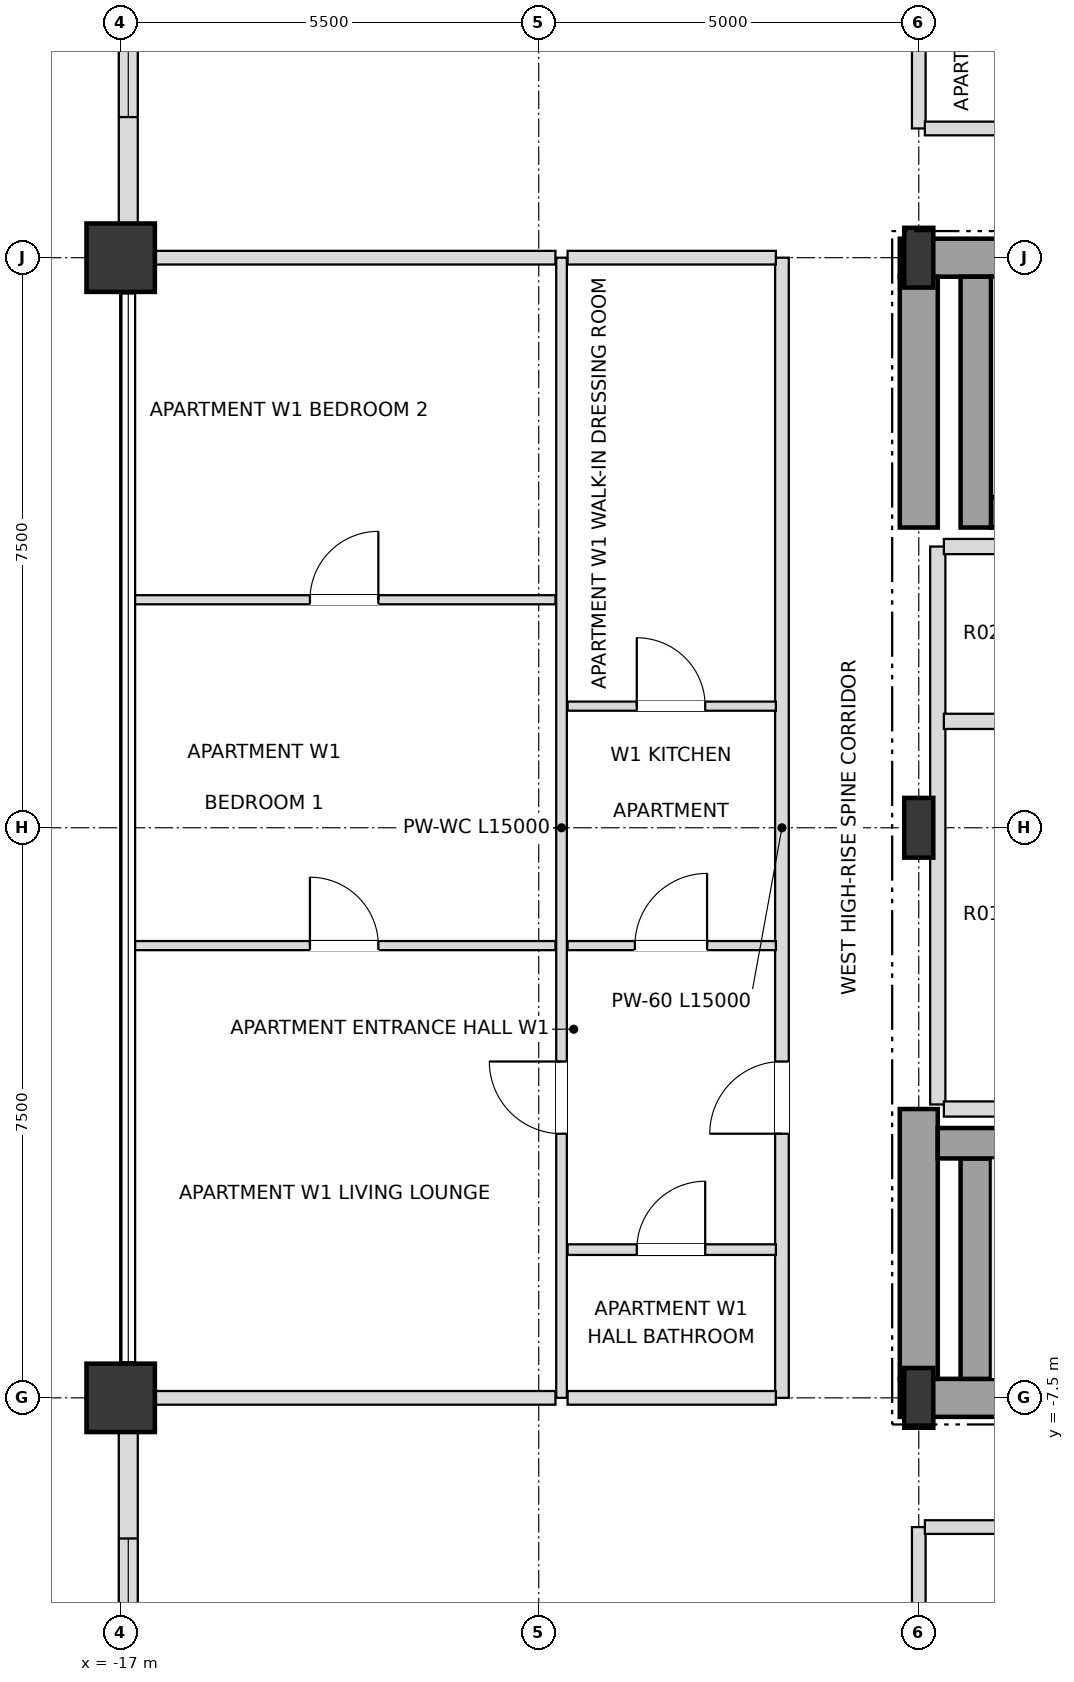
"""IFC4 building model, lengths in metres.
Left out: names, types, materials, properties, quantities, classifications, styles, units other than length and angle.
Written with IfcOpenShell. Run it as: python <this file> out.ifc"""

import sys

from ifc_helpers import new_model, si_unit, direction, frame, frame_2d, origin, origin_2d, place, context, subcontext, project, spatial, rectangle, i_section, extrude, element, fill, save


model = new_model("IFC4")
c1 = context("Model", 3, precision=1e-05, world=origin(), true_north=direction((0.0, 1.0)))
c2 = subcontext(c1, "Body", "Model", "MODEL_VIEW")
j1 = project(units=[si_unit("LENGTHUNIT", "METRE"), si_unit("PLANEANGLEUNIT", "RADIAN")], contexts=[c1])
p1 = place(None, origin())
s1 = spatial("IfcSite", under=j1, at=p1, CompositionType="ELEMENT")
p2 = place(p1, origin())
s2 = spatial("IfcBuilding", under=s1, at=p2, CompositionType="ELEMENT")
p3 = place(p2, frame((0.0, 0.0, 247.5)))
s3 = spatial("IfcBuildingStorey", under=s2, at=p3, CompositionType="ELEMENT", Elevation=247.5)
for number, where, z_axis, x_axis in (
    (1, (-6.5, -7.5, 0.0), (0.0, 0.0, 1.0), (1.0, 0.0, 0.0)),
    (2, (-6.5, 0.0, 0.0), (0.0, 0.0, 1.0), (1.0, 0.0, 0.0)),
    (3, (-6.5, 7.5, 0.0), (0.0, 0.0, 1.0), (1.0, 0.0, 0.0)),
):
    element("IfcColumn", number, at=place(p3, frame(where, z_axis=z_axis, x_axis=x_axis)), inside=s3, PredefinedType="COLUMN", context=c2, shape_type="SweptSolid", body=[
        extrude(i_section(OverallWidth=0.382, OverallDepth=0.786, WebThickness=0.02, FlangeThickness=0.033, at=origin_2d()), origin(), (0.0, 0.0, 1.0), 3.6),
    ])
for number, where, z_axis, x_axis in (
    (4, (-17.0, 7.5, 0.0), (0.0, 0.0, 1.0), (1.0, 0.0, 0.0)),
    (5, (-17.0, -7.5, 0.0), (0.0, 0.0, 1.0), (1.0, 0.0, 0.0)),
):
    element("IfcColumn", number, at=place(p3, frame(where, z_axis=z_axis, x_axis=x_axis)), inside=s3, PredefinedType="USERDEFINED", context=c2, shape_type="SweptSolid", body=[
        extrude(rectangle(XDim=0.9, YDim=0.9, at=origin_2d()), origin(), (0.0, 0.0, 1.0), 3.6),
    ])
p4 = place(p3, frame((-16.9, 12.555, 0.0), z_axis=(0.0, 0.0, 1.0), x_axis=(0.0, -1.0, 0.0)))
e6 = element("IfcWall", 6, at=p4, inside=s3, PredefinedType="SOLIDWALL", context=c2, shape_type="SweptSolid", body=[
    extrude(rectangle(XDim=4.61, YDim=0.25, at=frame_2d((2.305, 0.0))), origin(), (0.0, 0.0, 1.0), 2.748),
])
p5 = place(p4, frame((1.405, 0.0, 0.72)))
e7 = element("IfcOpeningElement", 7, at=p5, cuts=e6, PredefinedType="OPENING", context=c2, shape_type="SweptSolid", body=[
    extrude(rectangle(XDim=1.8, YDim=1.68, at=frame_2d((0.9, 0.84))), frame((0.0, 0.135, 0.0), z_axis=(0.0, -1.0, 0.0), x_axis=(1.0, 0.0, 0.0)), (0.0, 0.0, 1.0), 0.27),
])
p6 = place(p3, frame((-16.9, -7.945, 0.0), z_axis=(0.0, 0.0, 1.0), x_axis=(0.0, -1.0, 0.0)))
e8 = element("IfcWall", 8, at=p6, inside=s3, PredefinedType="SOLIDWALL", context=c2, shape_type="SweptSolid", body=[
    extrude(rectangle(XDim=4.61, YDim=0.25, at=frame_2d((2.305, 0.0))), origin(), (0.0, 0.0, 1.0), 2.748),
])
p7 = place(p6, frame((1.405, 0.0, 0.72)))
e9 = element("IfcOpeningElement", 9, at=p7, cuts=e8, PredefinedType="OPENING", context=c2, shape_type="SweptSolid", body=[
    extrude(rectangle(XDim=1.8, YDim=1.68, at=frame_2d((0.9, 0.84))), frame((0.0, 0.135, 0.0), z_axis=(0.0, -1.0, 0.0), x_axis=(1.0, 0.0, 0.0)), (0.0, 0.0, 1.0), 0.27),
])
p8 = place(p3, frame((-6.75, -7.5, 0.0), z_axis=(0.0, 0.0, 1.0), x_axis=(1.0, 0.0, 0.0)))
e10 = element("IfcWall", 10, at=p8, inside=s3, PredefinedType="SHEAR", context=c2, shape_type="SweptSolid", body=[
    extrude(rectangle(XDim=6.75, YDim=0.5, at=frame_2d((3.375, 0.0))), origin(), (0.0, 0.0, 1.0), 3.38),
])
p9 = place(p3, frame((-6.75, 7.5, 0.0), z_axis=(0.0, 0.0, 1.0), x_axis=(1.0, 0.0, 0.0)))
e11 = element("IfcWall", 11, at=p9, inside=s3, PredefinedType="SHEAR", context=c2, shape_type="SweptSolid", body=[
    extrude(rectangle(XDim=6.75, YDim=0.5, at=frame_2d((3.375, 0.0))), origin(), (0.0, 0.0, 1.0), 3.38),
])
p10 = place(p9, frame((1.65, 0.0, 0.0)))
e12 = element("IfcOpeningElement", 12, at=p10, cuts=e11, PredefinedType="OPENING", context=c2, shape_type="SweptSolid", body=[
    extrude(rectangle(XDim=1.05, YDim=2.15, at=frame_2d((0.525, 1.075))), frame((0.0, 0.26, 0.0), z_axis=(0.0, -1.0, 0.0), x_axis=(1.0, 0.0, 0.0)), (0.0, 0.0, 1.0), 0.52),
])
p11 = place(p3, frame((-6.5, -7.25, 0.0), z_axis=(0.0, 0.0, 1.0), x_axis=(0.0, 1.0, 0.0)))
e13 = element("IfcWall", 13, at=p11, inside=s3, PredefinedType="SHEAR", context=c2, shape_type="SweptSolid", body=[
    extrude(rectangle(XDim=3.55, YDim=0.5, at=frame_2d((1.775, 0.0))), origin(), (0.0, 0.0, 1.0), 3.38),
])
p12 = place(p3, frame((-6.5, 3.95, 0.0), z_axis=(0.0, 0.0, 1.0), x_axis=(0.0, 1.0, 0.0)))
e14 = element("IfcWall", 14, at=p12, inside=s3, PredefinedType="SHEAR", context=c2, shape_type="SweptSolid", body=[
    extrude(rectangle(XDim=3.3, YDim=0.5, at=frame_2d((1.65, 0.0))), origin(), (0.0, 0.0, 1.0), 3.38),
])
p13 = place(p3, frame((-5.75, -7.25, 0.0), z_axis=(0.0, 0.0, 1.0), x_axis=(0.0, 1.0, 0.0)))
e15 = element("IfcWall", 15, at=p13, inside=s3, PredefinedType="SHEAR", context=c2, shape_type="SweptSolid", body=[
    extrude(rectangle(XDim=2.9, YDim=0.4, at=frame_2d((1.45, 0.0))), origin(), (0.0, 0.0, 1.0), 3.38),
])
p14 = place(p3, frame((-6.25, -4.15, 0.0), z_axis=(0.0, 0.0, 1.0), x_axis=(1.0, 0.0, 0.0)))
e16 = element("IfcWall", 16, at=p14, inside=s3, PredefinedType="SHEAR", context=c2, shape_type="SweptSolid", body=[
    extrude(rectangle(XDim=7.78, YDim=0.4, at=frame_2d((3.89, 0.0))), origin(), (0.0, 0.0, 1.0), 3.38),
])
p15 = place(p3, frame((-5.55, 4.15, 0.0), z_axis=(0.0, 0.0, 1.0), x_axis=(1.0, 0.0, 0.0)))
e17 = element("IfcWall", 17, at=p15, inside=s3, PredefinedType="SHEAR", context=c2, shape_type="SweptSolid", body=[
    extrude(rectangle(XDim=7.08, YDim=0.4, at=frame_2d((3.54, 0.0))), origin(), (0.0, 0.0, 1.0), 3.38),
])
p16 = place(p3, frame((-5.75, 3.95, 0.0), z_axis=(0.0, 0.0, 1.0), x_axis=(0.0, 1.0, 0.0)))
e18 = element("IfcWall", 18, at=p16, inside=s3, PredefinedType="SHEAR", context=c2, shape_type="SweptSolid", body=[
    extrude(rectangle(XDim=3.3, YDim=0.4, at=frame_2d((1.65, 0.0))), origin(), (0.0, 0.0, 1.0), 3.38),
])
p17 = place(p3, frame((-11.2, -7.5, 0.0), z_axis=(0.0, 0.0, 1.0), x_axis=(0.0, 1.0, 0.0)))
e19 = element("IfcWall", 19, at=p17, inside=s3, PredefinedType="PARTITIONING", context=c2, shape_type="SweptSolid", body=[
    extrude(rectangle(XDim=15.0, YDim=0.14, at=frame_2d((7.5, 0.0))), origin(), (0.0, 0.0, 1.0), 3.38),
])
p18 = place(p17, frame((3.475, 0.0, 0.0)))
e20 = element("IfcOpeningElement", 20, at=p18, cuts=e19, PredefinedType="OPENING", context=c2, shape_type="SweptSolid", body=[
    extrude(rectangle(XDim=0.95, YDim=2.1, at=frame_2d((0.475, 1.05))), frame((0.0, 0.08, 0.0), z_axis=(0.0, -1.0, 0.0), x_axis=(1.0, 0.0, 0.0)), (0.0, 0.0, 1.0), 0.16),
])
p19 = place(p3, frame((-8.3, -7.5, 0.0), z_axis=(0.0, 0.0, 1.0), x_axis=(0.0, 1.0, 0.0)))
e21 = element("IfcWall", 21, at=p19, inside=s3, PredefinedType="PARTITIONING", context=c2, shape_type="SweptSolid", body=[
    extrude(rectangle(XDim=15.0, YDim=0.18, at=frame_2d((7.5, 0.0))), origin(), (0.0, 0.0, 1.0), 3.38),
])
p20 = place(p19, frame((3.475, 0.0, 0.0)))
e22 = element("IfcOpeningElement", 22, at=p20, cuts=e21, PredefinedType="OPENING", context=c2, shape_type="SweptSolid", body=[
    extrude(rectangle(XDim=0.95, YDim=2.15, at=frame_2d((0.475, 1.075))), frame((0.0, 0.1, 0.0), z_axis=(0.0, -1.0, 0.0), x_axis=(1.0, 0.0, 0.0)), (0.0, 0.0, 1.0), 0.2),
])
for number, where, z_axis, x_axis in (
    (23, (-6.5, -19.9, 0.0), (0.0, 0.0, 1.0), (0.0, 1.0, 0.0)),
    (24, (-6.5, 9.2, 0.0), (0.0, 0.0, 1.0), (0.0, 1.0, 0.0)),
):
    element("IfcWall", number, at=place(p3, frame(where, z_axis=z_axis, x_axis=x_axis)), inside=s3, PredefinedType="PARTITIONING", context=c2, shape_type="SweptSolid", body=[
        extrude(rectangle(XDim=10.7, YDim=0.18, at=frame_2d((5.35, 0.0))), origin(), (0.0, 0.0, 1.0), 2.826),
    ])
p21 = place(p3, frame((-6.25, -3.64, 0.0), z_axis=(0.0, 0.0, 1.0), x_axis=(0.0, 1.0, 0.0)))
e25 = element("IfcWall", 25, at=p21, inside=s3, PredefinedType="SOLIDWALL", context=c2, shape_type="SweptSolid", body=[
    extrude(rectangle(XDim=7.34, YDim=0.2, at=frame_2d((3.67, 0.0))), origin(), (0.0, 0.0, 1.0), 3.38),
])
p22 = place(p3, frame((-6.42, -9.2, 0.0), z_axis=(0.0, 0.0, 1.0), x_axis=(1.0, 0.0, 0.0)))
e26 = element("IfcWall", 26, at=p22, inside=s3, PredefinedType="PARTITIONING", context=c2, shape_type="SweptSolid", body=[
    extrude(rectangle(XDim=5.19, YDim=0.18, at=frame_2d((2.595, 0.0))), origin(), (0.0, 0.0, 1.0), 3.38),
])
p23 = place(p22, frame((2.135, 0.0, 0.0)))
e27 = element("IfcOpeningElement", 27, at=p23, cuts=e26, PredefinedType="OPENING", context=c2, shape_type="SweptSolid", body=[
    extrude(rectangle(XDim=0.95, YDim=2.15, at=frame_2d((0.475, 1.075))), frame((0.0, 0.1, 0.0), z_axis=(0.0, -1.0, 0.0), x_axis=(1.0, 0.0, 0.0)), (0.0, 0.0, 1.0), 0.2),
])
p24 = place(p3, frame((-16.9, -7.5, 0.0), z_axis=(0.0, 0.0, 1.0), x_axis=(1.0, 0.0, 0.0)))
e28 = element("IfcWall", 28, at=p24, inside=s3, PredefinedType="PARTITIONING", context=c2, shape_type="SweptSolid", body=[
    extrude(rectangle(XDim=5.62, YDim=0.18, at=frame_2d((2.81, 0.0))), origin(), (0.0, 0.0, 1.0), 2.826),
])
p25 = place(p3, frame((-11.12, -7.5, 0.0), z_axis=(0.0, 0.0, 1.0), x_axis=(1.0, 0.0, 0.0)))
e29 = element("IfcWall", 29, at=p25, inside=s3, PredefinedType="PARTITIONING", context=c2, shape_type="SweptSolid", body=[
    extrude(rectangle(XDim=2.74, YDim=0.18, at=frame_2d((1.37, 0.0))), origin(), (0.0, 0.0, 1.0), 2.826),
])
p26 = place(p3, frame((-11.12, -5.55, 0.0), z_axis=(0.0, 0.0, 1.0), x_axis=(1.0, 0.0, 0.0)))
e30 = element("IfcWall", 30, at=p26, inside=s3, PredefinedType="PARTITIONING", context=c2, shape_type="SweptSolid", body=[
    extrude(rectangle(XDim=2.74, YDim=0.14, at=frame_2d((1.37, 0.0))), origin(), (0.0, 0.0, 1.0), 3.38),
])
p27 = place(p26, frame((0.91, 0.0, 0.0)))
e31 = element("IfcOpeningElement", 31, at=p27, cuts=e30, PredefinedType="OPENING", context=c2, shape_type="SweptSolid", body=[
    extrude(rectangle(XDim=0.9, YDim=2.1, at=frame_2d((0.45, 1.05))), frame((0.0, 0.08, 0.0), z_axis=(0.0, -1.0, 0.0), x_axis=(1.0, 0.0, 0.0)), (0.0, 0.0, 1.0), 0.16),
])
p28 = place(p3, frame((-6.17, -3.7, 0.0), z_axis=(0.0, 0.0, 1.0), x_axis=(1.0, 0.0, 0.0)))
e32 = element("IfcWall", 32, at=p28, inside=s3, PredefinedType="SOLIDWALL", context=c2, shape_type="SweptSolid", body=[
    extrude(rectangle(XDim=1.94, YDim=0.2, at=frame_2d((0.97, 0.0))), origin(), (0.0, 0.0, 1.0), 3.38),
])
p29 = place(p3, frame((-16.82, -1.55, 0.0), z_axis=(0.0, 0.0, 1.0), x_axis=(1.0, 0.0, 0.0)))
e33 = element("IfcWall", 33, at=p29, inside=s3, PredefinedType="PARTITIONING", context=c2, shape_type="SweptSolid", body=[
    extrude(rectangle(XDim=5.54, YDim=0.12, at=frame_2d((2.77, 0.0))), origin(), (0.0, 0.0, 1.0), 3.018),
])
p30 = place(p29, frame((2.31, 0.0, 0.0)))
e34 = element("IfcOpeningElement", 34, at=p30, cuts=e33, PredefinedType="OPENING", context=c2, shape_type="SweptSolid", body=[
    extrude(rectangle(XDim=0.9, YDim=2.1, at=frame_2d((0.45, 1.05))), frame((0.0, 0.07, 0.0), z_axis=(0.0, -1.0, 0.0), x_axis=(1.0, 0.0, 0.0)), (0.0, 0.0, 1.0), 0.14),
])
p31 = place(p3, frame((-11.12, -1.55, 0.0), z_axis=(0.0, 0.0, 1.0), x_axis=(1.0, 0.0, 0.0)))
e35 = element("IfcWall", 35, at=p31, inside=s3, PredefinedType="PARTITIONING", context=c2, shape_type="SweptSolid", body=[
    extrude(rectangle(XDim=2.74, YDim=0.12, at=frame_2d((1.37, 0.0))), origin(), (0.0, 0.0, 1.0), 3.38),
])
p32 = place(p31, frame((0.885, 0.0, 0.0)))
e36 = element("IfcOpeningElement", 36, at=p32, cuts=e35, PredefinedType="OPENING", context=c2, shape_type="SweptSolid", body=[
    extrude(rectangle(XDim=0.95, YDim=2.1, at=frame_2d((0.475, 1.05))), frame((0.0, 0.07, 0.0), z_axis=(0.0, -1.0, 0.0), x_axis=(1.0, 0.0, 0.0)), (0.0, 0.0, 1.0), 0.14),
])
p33 = place(p3, frame((-6.17, 1.4, 0.0), z_axis=(0.0, 0.0, 1.0), x_axis=(1.0, 0.0, 0.0)))
e37 = element("IfcWall", 37, at=p33, inside=s3, PredefinedType="SOLIDWALL", context=c2, shape_type="SweptSolid", body=[
    extrude(rectangle(XDim=1.94, YDim=0.2, at=frame_2d((0.97, 0.0))), origin(), (0.0, 0.0, 1.0), 3.38),
])
p34 = place(p3, frame((-11.12, 1.6, 0.0), z_axis=(0.0, 0.0, 1.0), x_axis=(1.0, 0.0, 0.0)))
e38 = element("IfcWall", 38, at=p34, inside=s3, PredefinedType="PARTITIONING", context=c2, shape_type="SweptSolid", body=[
    extrude(rectangle(XDim=2.74, YDim=0.12, at=frame_2d((1.37, 0.0))), origin(), (0.0, 0.0, 1.0), 3.38),
])
p35 = place(p34, frame((0.91, 0.0, 0.0)))
e39 = element("IfcOpeningElement", 39, at=p35, cuts=e38, PredefinedType="OPENING", context=c2, shape_type="SweptSolid", body=[
    extrude(rectangle(XDim=0.9, YDim=2.1, at=frame_2d((0.45, 1.05))), frame((0.0, 0.07, 0.0), z_axis=(0.0, -1.0, 0.0), x_axis=(1.0, 0.0, 0.0)), (0.0, 0.0, 1.0), 0.14),
])
p36 = place(p3, frame((-16.82, 3.0, 0.0), z_axis=(0.0, 0.0, 1.0), x_axis=(1.0, 0.0, 0.0)))
e40 = element("IfcWall", 40, at=p36, inside=s3, PredefinedType="PARTITIONING", context=c2, shape_type="SweptSolid", body=[
    extrude(rectangle(XDim=5.54, YDim=0.12, at=frame_2d((2.77, 0.0))), origin(), (0.0, 0.0, 1.0), 3.018),
])
p37 = place(p36, frame((2.31, 0.0, 0.0)))
e41 = element("IfcOpeningElement", 41, at=p37, cuts=e40, PredefinedType="OPENING", context=c2, shape_type="SweptSolid", body=[
    extrude(rectangle(XDim=0.9, YDim=2.1, at=frame_2d((0.45, 1.05))), frame((0.0, 0.07, 0.0), z_axis=(0.0, -1.0, 0.0), x_axis=(1.0, 0.0, 0.0)), (0.0, 0.0, 1.0), 0.14),
])
p38 = place(p3, frame((-6.17, 3.7, 0.0), z_axis=(0.0, 0.0, 1.0), x_axis=(1.0, 0.0, 0.0)))
e42 = element("IfcWall", 42, at=p38, inside=s3, PredefinedType="SOLIDWALL", context=c2, shape_type="SweptSolid", body=[
    extrude(rectangle(XDim=1.94, YDim=0.2, at=frame_2d((0.97, 0.0))), origin(), (0.0, 0.0, 1.0), 3.38),
])
p39 = place(p3, frame((-16.9, 7.5, 0.0), z_axis=(0.0, 0.0, 1.0), x_axis=(1.0, 0.0, 0.0)))
e43 = element("IfcWall", 43, at=p39, inside=s3, PredefinedType="PARTITIONING", context=c2, shape_type="SweptSolid", body=[
    extrude(rectangle(XDim=5.62, YDim=0.18, at=frame_2d((2.81, 0.0))), origin(), (0.0, 0.0, 1.0), 2.826),
])
p40 = place(p3, frame((-11.12, 7.5, 0.0), z_axis=(0.0, 0.0, 1.0), x_axis=(1.0, 0.0, 0.0)))
e44 = element("IfcWall", 44, at=p40, inside=s3, PredefinedType="PARTITIONING", context=c2, shape_type="SweptSolid", body=[
    extrude(rectangle(XDim=2.74, YDim=0.18, at=frame_2d((1.37, 0.0))), origin(), (0.0, 0.0, 1.0), 2.826),
])
p41 = place(p3, frame((-6.42, 9.2, 0.0), z_axis=(0.0, 0.0, 1.0), x_axis=(1.0, 0.0, 0.0)))
e45 = element("IfcWall", 45, at=p41, inside=s3, PredefinedType="PARTITIONING", context=c2, shape_type="SweptSolid", body=[
    extrude(rectangle(XDim=1.79, YDim=0.18, at=frame_2d((0.895, 0.0))), origin(), (0.0, 0.0, 1.0), 3.38),
])
p42 = place(p5, origin())
e46 = element("IfcWindow", 46, at=p42, inside=s3, PartitioningType="SINGLE_PANEL", PredefinedType="WINDOW", context=c2, shape_type="SweptSolid", body=[
    extrude(rectangle(XDim=1.8, YDim=1.68, at=frame_2d((0.9, 0.84))), frame((0.0, 0.03, 0.0), z_axis=(0.0, -1.0, 0.0), x_axis=(1.0, 0.0, 0.0)), (0.0, 0.0, 1.0), 0.06),
])
fill(e7, e46)
p43 = place(p7, origin())
e47 = element("IfcWindow", 47, at=p43, inside=s3, PartitioningType="SINGLE_PANEL", PredefinedType="WINDOW", context=c2, shape_type="SweptSolid", body=[
    extrude(rectangle(XDim=1.8, YDim=1.68, at=frame_2d((0.9, 0.84))), frame((0.0, 0.03, 0.0), z_axis=(0.0, -1.0, 0.0), x_axis=(1.0, 0.0, 0.0)), (0.0, 0.0, 1.0), 0.06),
])
fill(e9, e47)
p44 = place(p27, origin())
e48 = element("IfcDoor", 48, at=p44, inside=s3, OperationType="SINGLE_SWING_RIGHT", PredefinedType="DOOR", context=c2, shape_type="SweptSolid", body=[
    extrude(rectangle(XDim=0.9, YDim=2.1, at=frame_2d((0.45, 1.05))), frame((0.0, 0.025, 0.0), z_axis=(0.0, -1.0, 0.0), x_axis=(1.0, 0.0, 0.0)), (0.0, 0.0, 1.0), 0.05),
])
fill(e31, e48)
p45 = place(p20, origin())
e49 = element("IfcDoor", 49, at=p45, inside=s3, OperationType="SINGLE_SWING_LEFT", PredefinedType="DOOR", context=c2, shape_type="SweptSolid", body=[
    extrude(rectangle(XDim=0.95, YDim=2.15, at=frame_2d((0.475, 1.075))), frame((0.0, 0.025, 0.0), z_axis=(0.0, -1.0, 0.0), x_axis=(1.0, 0.0, 0.0)), (0.0, 0.0, 1.0), 0.05),
])
fill(e22, e49)
p46 = place(p32, origin())
e50 = element("IfcDoor", 50, at=p46, inside=s3, OperationType="SINGLE_SWING_RIGHT", PredefinedType="DOOR", context=c2, shape_type="SweptSolid", body=[
    extrude(rectangle(XDim=0.95, YDim=2.1, at=frame_2d((0.475, 1.05))), frame((0.0, 0.025, 0.0), z_axis=(0.0, -1.0, 0.0), x_axis=(1.0, 0.0, 0.0)), (0.0, 0.0, 1.0), 0.05),
])
fill(e36, e50)
p47 = place(p35, origin())
e51 = element("IfcDoor", 51, at=p47, inside=s3, OperationType="SINGLE_SWING_LEFT", PredefinedType="DOOR", context=c2, shape_type="SweptSolid", body=[
    extrude(rectangle(XDim=0.9, YDim=2.1, at=frame_2d((0.45, 1.05))), frame((0.0, 0.025, 0.0), z_axis=(0.0, -1.0, 0.0), x_axis=(1.0, 0.0, 0.0)), (0.0, 0.0, 1.0), 0.05),
])
fill(e39, e51)
p48 = place(p18, origin())
e52 = element("IfcDoor", 52, at=p48, inside=s3, OperationType="SINGLE_SWING_RIGHT", PredefinedType="DOOR", context=c2, shape_type="SweptSolid", body=[
    extrude(rectangle(XDim=0.95, YDim=2.1, at=frame_2d((0.475, 1.05))), frame((0.0, 0.025, 0.0), z_axis=(0.0, -1.0, 0.0), x_axis=(1.0, 0.0, 0.0)), (0.0, 0.0, 1.0), 0.05),
])
fill(e20, e52)
p49 = place(p30, origin())
e53 = element("IfcDoor", 53, at=p49, inside=s3, OperationType="SINGLE_SWING_LEFT", PredefinedType="DOOR", context=c2, shape_type="SweptSolid", body=[
    extrude(rectangle(XDim=0.9, YDim=2.1, at=frame_2d((0.45, 1.05))), frame((0.0, 0.025, 0.0), z_axis=(0.0, -1.0, 0.0), x_axis=(1.0, 0.0, 0.0)), (0.0, 0.0, 1.0), 0.05),
])
fill(e34, e53)
p50 = place(p37, origin())
e54 = element("IfcDoor", 54, at=p50, inside=s3, OperationType="SINGLE_SWING_RIGHT", PredefinedType="DOOR", context=c2, shape_type="SweptSolid", body=[
    extrude(rectangle(XDim=0.9, YDim=2.1, at=frame_2d((0.45, 1.05))), frame((0.0, 0.025, 0.0), z_axis=(0.0, -1.0, 0.0), x_axis=(1.0, 0.0, 0.0)), (0.0, 0.0, 1.0), 0.05),
])
fill(e41, e54)
save(model, sys.argv[1])
